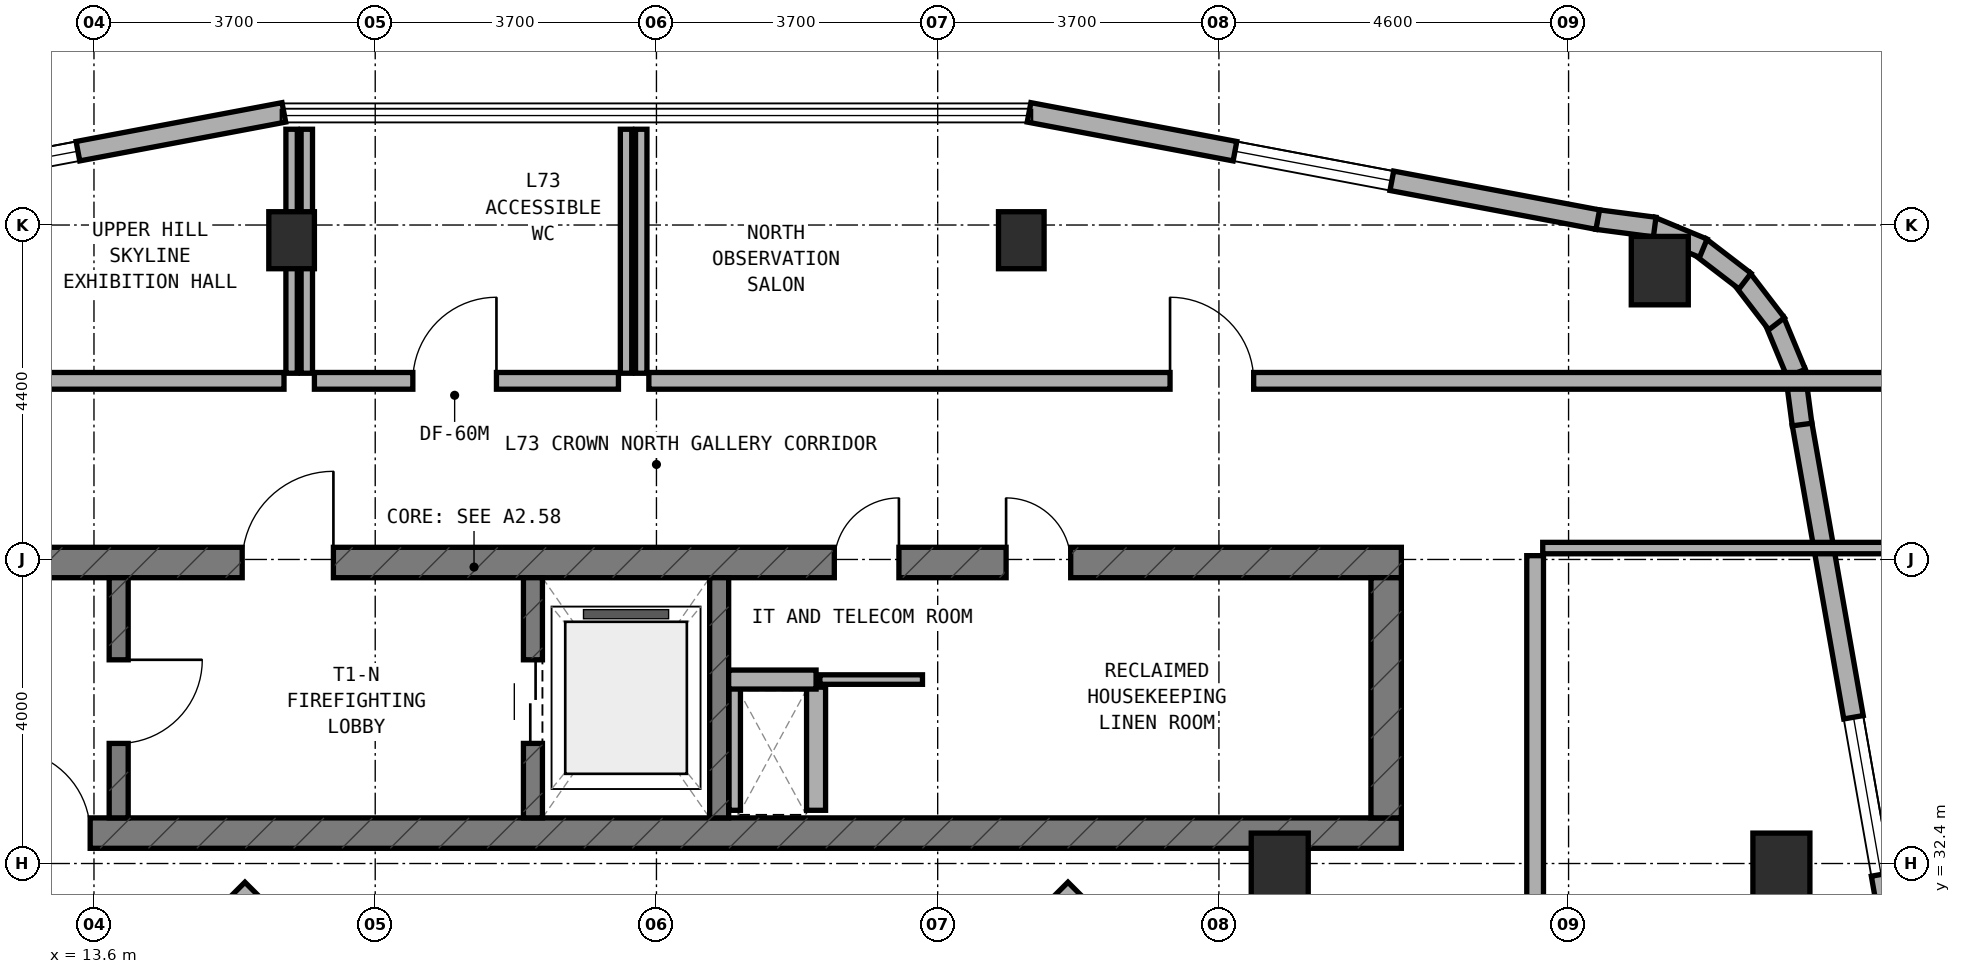
"""IFC4 building model, lengths in metres.
Left out: names, types, materials, properties, quantities, classifications, styles, units other than length and angle.
Written with IfcOpenShell. Run it as: python <this file> out.ifc"""

import sys

from ifc_helpers import new_model, si_unit, direction, frame, frame_2d, origin, origin_2d, place, context, subcontext, project, spatial, rectangle, extrude, element, fill, save


model = new_model("IFC4")
c1 = context("Model", 3, precision=1e-05, world=origin(), true_north=direction((0.0, 1.0)))
c2 = subcontext(c1, "Body", "Model", "MODEL_VIEW")
j1 = project(units=[si_unit("LENGTHUNIT", "METRE"), si_unit("PLANEANGLEUNIT", "RADIAN")], contexts=[c1])
p1 = place(None, origin())
s1 = spatial("IfcSite", under=j1, at=p1, CompositionType="ELEMENT")
p2 = place(p1, origin())
s2 = spatial("IfcBuilding", under=s1, at=p2, CompositionType="ELEMENT")
p3 = place(p2, frame((0.0, 0.0, 268.4)))
s3 = spatial("IfcBuildingStorey", under=s2, at=p3, CompositionType="ELEMENT", Elevation=268.4)
p4 = place(p3, frame((6.4, 32.8, 0.0), z_axis=(0.0, 0.0, 1.0), x_axis=(1.0, 0.0, 0.0)))
e1 = element("IfcWall", 1, at=p4, inside=s3, PredefinedType="SHEAR", context=c2, shape_type="SweptSolid", body=[
    extrude(rectangle(XDim=24.4, YDim=0.4, at=frame_2d((12.2, 0.0))), origin(), (0.0, 0.0, 1.0), 3.6),
])
p5 = place(p4, frame((6.05, 0.0, 0.0)))
e2 = element("IfcOpeningElement", 2, at=p5, cuts=e1, PredefinedType="OPENING", context=c2, shape_type="SweptSolid", body=[
    extrude(rectangle(XDim=1.1, YDim=2.15, at=frame_2d((0.55, 1.075))), frame((0.0, 0.21, 0.0), z_axis=(0.0, -1.0, 0.0), x_axis=(1.0, 0.0, 0.0)), (0.0, 0.0, 1.0), 0.42),
])
p6 = place(p3, frame((6.4, 36.36, 0.0), z_axis=(0.0, 0.0, 1.0), x_axis=(1.0, 0.0, 0.0)))
e3 = element("IfcWall", 3, at=p6, inside=s3, PredefinedType="SHEAR", context=c2, shape_type="SweptSolid", body=[
    extrude(rectangle(XDim=24.4, YDim=0.4, at=frame_2d((12.2, 0.0))), origin(), (0.0, 0.0, 1.0), 3.6),
])
p7 = place(p6, frame((9.15, 0.0, 0.0)))
e4 = element("IfcOpeningElement", 4, at=p7, cuts=e3, PredefinedType="OPENING", context=c2, shape_type="SweptSolid", body=[
    extrude(rectangle(XDim=1.2, YDim=2.15, at=frame_2d((0.6, 1.075))), frame((0.0, 0.21, 0.0), z_axis=(0.0, -1.0, 0.0), x_axis=(1.0, 0.0, 0.0)), (0.0, 0.0, 1.0), 0.42),
])
p8 = place(p6, frame((19.2, 0.0, 0.0)))
e5 = element("IfcOpeningElement", 5, at=p8, cuts=e3, PredefinedType="OPENING", context=c2, shape_type="SweptSolid", body=[
    extrude(rectangle(XDim=0.85, YDim=2.1, at=frame_2d((0.425, 1.05))), frame((0.0, 0.21, 0.0), z_axis=(0.0, -1.0, 0.0), x_axis=(1.0, 0.0, 0.0)), (0.0, 0.0, 1.0), 0.42),
])
p9 = place(p6, frame((16.94, 0.0, 0.0)))
e6 = element("IfcOpeningElement", 6, at=p9, cuts=e3, PredefinedType="OPENING", context=c2, shape_type="SweptSolid", body=[
    extrude(rectangle(XDim=0.85, YDim=2.1, at=frame_2d((0.425, 1.05))), frame((0.0, 0.21, 0.0), z_axis=(0.0, -1.0, 0.0), x_axis=(1.0, 0.0, 0.0)), (0.0, 0.0, 1.0), 0.42),
])
p10 = place(p3, frame((30.6, 33.0, 0.0), z_axis=(0.0, 0.0, 1.0), x_axis=(0.0, 1.0, 0.0)))
e7 = element("IfcWall", 7, at=p10, inside=s3, PredefinedType="SHEAR", context=c2, shape_type="SweptSolid", body=[
    extrude(rectangle(XDim=3.16, YDim=0.4, at=frame_2d((1.58, 0.0))), origin(), (0.0, 0.0, 1.0), 3.6),
])
p11 = place(p3, frame((13.925, 33.0, 0.0), z_axis=(0.0, 0.0, 1.0), x_axis=(0.0, 1.0, 0.0)))
e8 = element("IfcWall", 8, at=p11, inside=s3, PredefinedType="STANDARD", context=c2, shape_type="SweptSolid", body=[
    extrude(rectangle(XDim=3.16, YDim=0.25, at=frame_2d((1.58, 0.0))), origin(), (0.0, 0.0, 1.0), 3.32),
])
p12 = place(p11, frame((0.98, 0.0, 0.0)))
e9 = element("IfcOpeningElement", 9, at=p12, cuts=e8, PredefinedType="OPENING", context=c2, shape_type="SweptSolid", body=[
    extrude(rectangle(XDim=1.1, YDim=2.15, at=frame_2d((0.55, 1.075))), frame((0.0, 0.135, 0.0), z_axis=(0.0, -1.0, 0.0), x_axis=(1.0, 0.0, 0.0)), (0.0, 0.0, 1.0), 0.27),
])
p13 = place(p3, frame((19.375, 33.0, 0.0), z_axis=(0.0, 0.0, 1.0), x_axis=(0.0, 1.0, 0.0)))
e10 = element("IfcWall", 10, at=p13, inside=s3, PredefinedType="STANDARD", context=c2, shape_type="SweptSolid", body=[
    extrude(rectangle(XDim=3.16, YDim=0.25, at=frame_2d((1.58, 0.0))), origin(), (0.0, 0.0, 1.0), 3.32),
])
p14 = place(p13, frame((0.98, 0.0, 0.0)))
e11 = element("IfcOpeningElement", 11, at=p14, cuts=e10, PredefinedType="OPENING", context=c2, shape_type="SweptSolid", body=[
    extrude(rectangle(XDim=1.1, YDim=2.15, at=frame_2d((0.55, 1.075))), frame((0.0, 0.135, 0.0), z_axis=(0.0, -1.0, 0.0), x_axis=(1.0, 0.0, 0.0)), (0.0, 0.0, 1.0), 0.27),
])
p15 = place(p3, frame((21.825, 33.0, 0.0), z_axis=(0.0, 0.0, 1.0), x_axis=(0.0, 1.0, 0.0)))
e12 = element("IfcWall", 12, at=p15, inside=s3, PredefinedType="STANDARD", context=c2, shape_type="SweptSolid", body=[
    extrude(rectangle(XDim=3.16, YDim=0.25, at=frame_2d((1.58, 0.0))), origin(), (0.0, 0.0, 1.0), 3.32),
])
for number, where, z_axis, x_axis in (
    (13, (16.2, 40.6, 0.0), (0.0, 0.0, 1.0), (1.0, 0.0, 0.0)),
    (14, (25.8, 40.6, 0.0), (0.0, 0.0, 1.0), (1.0, 0.0, 0.0)),
):
    element("IfcColumn", number, at=place(p3, frame(where, z_axis=z_axis, x_axis=x_axis)), inside=s3, PredefinedType="COLUMN", context=c2, shape_type="SweptSolid", body=[
        extrude(rectangle(XDim=0.6, YDim=0.75, at=origin_2d()), origin(), (0.0, 0.0, 1.0), 3.6),
    ])
for number, where, z_axis, x_axis in (
    (15, (34.2, 40.2, 0.0), (0.0, 0.0, 1.0), (1.0, 0.0, 0.0)),
    (16, (35.8, 32.35, 0.0), (0.0, 0.0, 1.0), (1.0, 0.0, 0.0)),
    (17, (29.2, 32.35, 0.0), (0.0, 0.0, 1.0), (1.0, 0.0, 0.0)),
):
    element("IfcColumn", number, at=place(p3, frame(where, z_axis=z_axis, x_axis=x_axis)), inside=s3, PredefinedType="COLUMN", context=c2, shape_type="SweptSolid", body=[
        extrude(rectangle(XDim=0.75, YDim=0.9, at=origin_2d()), origin(), (0.0, 0.0, 1.0), 3.6),
    ])
p16 = place(p3, frame((37.482, 30.144, 0.0), z_axis=(0.0, 0.0, 1.0), x_axis=(-0.172801004781, 0.98495675679, 0.0)))
e18 = element("IfcWall", 18, at=p16, inside=s3, PredefinedType="STANDARD", context=c2, shape_type="SweptSolid", body=[
    extrude(rectangle(XDim=8.165, YDim=0.26, at=frame_2d((4.083, 0.0))), origin(), (0.0, 0.0, 1.0), 3.32),
])
p17 = place(p16, frame((2.144, 0.0, 0.85)))
e19 = element("IfcOpeningElement", 19, at=p17, cuts=e18, PredefinedType="OPENING", context=c2, shape_type="SweptSolid", body=[
    extrude(rectangle(XDim=2.1, YDim=1.5, at=frame_2d((1.05, 0.75))), frame((0.0, 0.14, 0.0), z_axis=(0.0, -1.0, 0.0), x_axis=(1.0, 0.0, 0.0)), (0.0, 0.0, 1.0), 0.28),
])
p18 = place(p3, frame((36.072, 38.175, 0.0), z_axis=(0.0, 0.0, 1.0), x_axis=(-0.130255288807, 0.991480488834, 0.0)))
e20 = element("IfcWall", 20, at=p18, inside=s3, PredefinedType="STANDARD", context=c2, shape_type="SweptSolid", body=[
    extrude(rectangle(XDim=0.729, YDim=0.26, at=frame_2d((0.365, 0.0))), origin(), (0.0, 0.0, 1.0), 3.32),
])
for number, where, z_axis, x_axis in (
    (21, (35.995, 38.852, 0.0), (0.0, 0.0, 1.0), (-0.384, 0.924, 0.0)),
    (22, (35.737, 39.501, 0.0), (0.0, 0.0, 1.0), (-0.609, 0.793, 0.0)),
    (23, (35.321, 40.062, 0.0), (0.0, 0.0, 1.0), (-0.793, 0.609, 0.0)),
):
    element("IfcWall", number, at=place(p3, frame(where, z_axis=z_axis, x_axis=x_axis)), inside=s3, PredefinedType="STANDARD", context=c2, shape_type="SweptSolid", body=[
        extrude(rectangle(XDim=0.746, YDim=0.26, at=frame_2d((0.373, 0.0))), origin(), (0.0, 0.0, 1.0), 3.32),
    ])
p19 = place(p3, frame((34.773, 40.495, 0.0), z_axis=(0.0, 0.0, 1.0), x_axis=(-0.923637576129, 0.383267045233, 0.0)))
e24 = element("IfcWall", 24, at=p19, inside=s3, PredefinedType="STANDARD", context=c2, shape_type="SweptSolid", body=[
    extrude(rectangle(XDim=0.746, YDim=0.26, at=frame_2d((0.373, 0.0))), origin(), (0.0, 0.0, 1.0), 3.32),
])
p20 = place(p3, frame((34.133, 40.773, 0.0), z_axis=(0.0, 0.0, 1.0), x_axis=(-0.991559404866, 0.129653178221, 0.0)))
e25 = element("IfcWall", 25, at=p20, inside=s3, PredefinedType="STANDARD", context=c2, shape_type="SweptSolid", body=[
    extrude(rectangle(XDim=0.764, YDim=0.26, at=frame_2d((0.382, 0.0))), origin(), (0.0, 0.0, 1.0), 3.32),
])
p21 = place(p3, frame((33.384, 40.871, 0.0), z_axis=(0.0, 0.0, 1.0), x_axis=(-0.982680718126, 0.185306789468, 0.0)))
e26 = element("IfcWall", 26, at=p21, inside=s3, PredefinedType="STANDARD", context=c2, shape_type="SweptSolid", body=[
    extrude(rectangle(XDim=7.614, YDim=0.26, at=frame_2d((3.807, 0.0))), origin(), (0.0, 0.0, 1.0), 3.32),
])
p22 = place(p21, frame((2.757, 0.0, 0.85)))
e27 = element("IfcOpeningElement", 27, at=p22, cuts=e26, PredefinedType="OPENING", context=c2, shape_type="SweptSolid", body=[
    extrude(rectangle(XDim=2.1, YDim=1.5, at=frame_2d((1.05, 0.75))), frame((0.0, 0.14, 0.0), z_axis=(0.0, -1.0, 0.0), x_axis=(1.0, 0.0, 0.0)), (0.0, 0.0, 1.0), 0.28),
])
p23 = place(p3, frame((16.098, 42.282, 0.0), z_axis=(0.0, 0.0, 1.0), x_axis=(-0.982680718126, -0.185306789468, 0.0)))
e28 = element("IfcWall", 28, at=p23, inside=s3, PredefinedType="STANDARD", context=c2, shape_type="SweptSolid", body=[
    extrude(rectangle(XDim=7.614, YDim=0.26, at=frame_2d((3.807, 0.0))), origin(), (0.0, 0.0, 1.0), 3.32),
])
p24 = place(p23, frame((2.757, 0.0, 0.85)))
e29 = element("IfcOpeningElement", 29, at=p24, cuts=e28, PredefinedType="OPENING", context=c2, shape_type="SweptSolid", body=[
    extrude(rectangle(XDim=2.1, YDim=1.5, at=frame_2d((1.05, 0.75))), frame((0.0, 0.14, 0.0), z_axis=(0.0, -1.0, 0.0), x_axis=(1.0, 0.0, 0.0)), (0.0, 0.0, 1.0), 0.28),
])
for number, where, z_axis, x_axis in (
    (30, (27.956, 30.428, 0.0), (0.0, 0.0, 1.0), (-0.707, 0.707, 0.0)),
    (31, (15.678, 32.062, 0.0), (0.0, 0.0, 1.0), (-0.707, -0.707, 0.0)),
):
    element("IfcWall", number, at=place(p3, frame(where, z_axis=z_axis, x_axis=x_axis)), inside=s3, PredefinedType="STANDARD", context=c2, shape_type="SweptSolid", body=[
        extrude(rectangle(XDim=2.311, YDim=0.26, at=frame_2d((1.155, 0.0))), origin(), (0.0, 0.0, 1.0), 3.32),
    ])
p25 = place(p3, frame((22.03, 33.1, 0.0), z_axis=(0.0, 0.0, 1.0), x_axis=(0.0, 1.0, 0.0)))
e32 = element("IfcWall", 32, at=p25, inside=s3, PredefinedType="PARTITIONING", context=c2, shape_type="SweptSolid", body=[
    extrude(rectangle(XDim=1.62, YDim=0.15, at=frame_2d((0.81, 0.0))), origin(), (0.0, 0.0, 1.0), 3.32),
])
p26 = place(p3, frame((23.1, 33.1, 0.0), z_axis=(0.0, 0.0, 1.0), x_axis=(0.0, 1.0, 0.0)))
e33 = element("IfcWall", 33, at=p26, inside=s3, PredefinedType="SOLIDWALL", context=c2, shape_type="SweptSolid", body=[
    extrude(rectangle(XDim=1.62, YDim=0.25, at=frame_2d((0.81, 0.0))), origin(), (0.0, 0.0, 1.0), 3.32),
])
p27 = place(p3, frame((21.95, 34.82, 0.0), z_axis=(0.0, 0.0, 1.0), x_axis=(1.0, 0.0, 0.0)))
e34 = element("IfcWall", 34, at=p27, inside=s3, PredefinedType="SOLIDWALL", context=c2, shape_type="SweptSolid", body=[
    extrude(rectangle(XDim=1.15, YDim=0.25, at=frame_2d((0.575, 0.0))), origin(), (0.0, 0.0, 1.0), 3.32),
])
p28 = place(p3, frame((23.15, 34.82, 0.0), z_axis=(0.0, 0.0, 1.0), x_axis=(1.0, 0.0, 0.0)))
e35 = element("IfcWall", 35, at=p28, inside=s3, PredefinedType="PARTITIONING", context=c2, shape_type="SweptSolid", body=[
    extrude(rectangle(XDim=1.35, YDim=0.125, at=frame_2d((0.675, 0.0))), origin(), (0.0, 0.0, 1.0), 3.32),
])
p29 = place(p3, frame((32.66, 36.55, 0.0), z_axis=(0.0, 0.0, 1.0), x_axis=(1.0, 0.0, 0.0)))
e36 = element("IfcWall", 36, at=p29, inside=s3, PredefinedType="PARTITIONING", context=c2, shape_type="SweptSolid", body=[
    extrude(rectangle(XDim=4.6, YDim=0.15, at=frame_2d((2.3, 0.0))), origin(), (0.0, 0.0, 1.0), 2.795),
])
p30 = place(p3, frame((32.56, 13.55, 0.0), z_axis=(0.0, 0.0, 1.0), x_axis=(0.0, 1.0, 0.0)))
e37 = element("IfcWall", 37, at=p30, inside=s3, PredefinedType="SOLIDWALL", context=c2, shape_type="SweptSolid", body=[
    extrude(rectangle(XDim=22.9, YDim=0.22, at=frame_2d((11.45, 0.0))), origin(), (0.0, 0.0, 1.0), 2.795),
])
p31 = place(p30, frame((9.8, 0.0, 0.0)))
e38 = element("IfcOpeningElement", 38, at=p31, cuts=e37, PredefinedType="OPENING", context=c2, shape_type="SweptSolid", body=[
    extrude(rectangle(XDim=1.1, YDim=2.1, at=frame_2d((0.55, 1.05))), frame((0.0, 0.12, 0.0), z_axis=(0.0, -1.0, 0.0), x_axis=(1.0, 0.0, 0.0)), (0.0, 0.0, 1.0), 0.24),
])
p32 = place(p3, frame((16.2, 38.85, 0.0), z_axis=(0.0, 0.0, 1.0), x_axis=(0.0, 1.0, 0.0)))
e39 = element("IfcWall", 39, at=p32, inside=s3, PredefinedType="PARTITIONING", context=c2, shape_type="SweptSolid", body=[
    extrude(rectangle(XDim=3.21, YDim=0.15, at=frame_2d((1.605, 0.0))), origin(), (0.0, 0.0, 1.0), 2.795),
])
p33 = place(p3, frame((4.74, 38.75, 0.0), z_axis=(0.0, 0.0, 1.0), x_axis=(1.0, 0.0, 0.0)))
e40 = element("IfcWall", 40, at=p33, inside=s3, PredefinedType="SOLIDWALL", context=c2, shape_type="SweptSolid", body=[
    extrude(rectangle(XDim=11.36, YDim=0.22, at=frame_2d((5.68, 0.0))), origin(), (0.0, 0.0, 1.0), 2.795),
])
p34 = place(p33, frame((4.607, 0.0, 0.0)))
e41 = element("IfcOpeningElement", 41, at=p34, cuts=e40, PredefinedType="OPENING", context=c2, shape_type="SweptSolid", body=[
    extrude(rectangle(XDim=1.1, YDim=2.1, at=frame_2d((0.55, 1.05))), frame((0.0, 0.12, 0.0), z_axis=(0.0, -1.0, 0.0), x_axis=(1.0, 0.0, 0.0)), (0.0, 0.0, 1.0), 0.24),
])
for number, where, z_axis, x_axis in (
    (42, (16.4, 38.85, 0.0), (0.0, 0.0, 1.0), (0.0, 1.0, 0.0)),
    (43, (20.6, 38.85, 0.0), (0.0, 0.0, 1.0), (0.0, 1.0, 0.0)),
):
    element("IfcWall", number, at=place(p3, frame(where, z_axis=z_axis, x_axis=x_axis)), inside=s3, PredefinedType="PARTITIONING", context=c2, shape_type="SweptSolid", body=[
        extrude(rectangle(XDim=3.21, YDim=0.15, at=frame_2d((1.605, 0.0))), origin(), (0.0, 0.0, 1.0), 3.015),
    ])
p35 = place(p3, frame((16.5, 38.75, 0.0), z_axis=(0.0, 0.0, 1.0), x_axis=(1.0, 0.0, 0.0)))
e44 = element("IfcWall", 44, at=p35, inside=s3, PredefinedType="SOLIDWALL", context=c2, shape_type="SweptSolid", body=[
    extrude(rectangle(XDim=4.0, YDim=0.22, at=frame_2d((2.0, 0.0))), origin(), (0.0, 0.0, 1.0), 2.995),
])
p36 = place(p35, frame((1.295, 0.0, 0.0)))
e45 = element("IfcOpeningElement", 45, at=p36, cuts=e44, PredefinedType="OPENING", context=c2, shape_type="SweptSolid", body=[
    extrude(rectangle(XDim=1.1, YDim=2.1, at=frame_2d((0.55, 1.05))), frame((0.0, 0.12, 0.0), z_axis=(0.0, -1.0, 0.0), x_axis=(1.0, 0.0, 0.0)), (0.0, 0.0, 1.0), 0.24),
])
p37 = place(p3, frame((20.8, 38.85, 0.0), z_axis=(0.0, 0.0, 1.0), x_axis=(0.0, 1.0, 0.0)))
e46 = element("IfcWall", 46, at=p37, inside=s3, PredefinedType="PARTITIONING", context=c2, shape_type="SweptSolid", body=[
    extrude(rectangle(XDim=3.21, YDim=0.15, at=frame_2d((1.605, 0.0))), origin(), (0.0, 0.0, 1.0), 3.015),
])
p38 = place(p3, frame((20.9, 38.75, 0.0), z_axis=(0.0, 0.0, 1.0), x_axis=(1.0, 0.0, 0.0)))
e47 = element("IfcWall", 47, at=p38, inside=s3, PredefinedType="SOLIDWALL", context=c2, shape_type="SweptSolid", body=[
    extrude(rectangle(XDim=16.36, YDim=0.22, at=frame_2d((8.18, 0.0))), origin(), (0.0, 0.0, 1.0), 2.795),
])
p39 = place(p38, frame((6.857, 0.0, 0.0)))
e48 = element("IfcOpeningElement", 48, at=p39, cuts=e47, PredefinedType="OPENING", context=c2, shape_type="SweptSolid", body=[
    extrude(rectangle(XDim=1.1, YDim=2.1, at=frame_2d((0.55, 1.05))), frame((0.0, 0.12, 0.0), z_axis=(0.0, -1.0, 0.0), x_axis=(1.0, 0.0, 0.0)), (0.0, 0.0, 1.0), 0.24),
])
p40 = place(p17, origin())
e49 = element("IfcWindow", 49, at=p40, inside=s3, PartitioningType="SINGLE_PANEL", PredefinedType="WINDOW", context=c2, shape_type="SweptSolid", body=[
    extrude(rectangle(XDim=2.1, YDim=1.5, at=frame_2d((1.05, 0.75))), frame((0.0, 0.03, 0.0), z_axis=(0.0, -1.0, 0.0), x_axis=(1.0, 0.0, 0.0)), (0.0, 0.0, 1.0), 0.06),
])
fill(e19, e49)
p41 = place(p22, origin())
e50 = element("IfcWindow", 50, at=p41, inside=s3, PartitioningType="SINGLE_PANEL", PredefinedType="WINDOW", context=c2, shape_type="SweptSolid", body=[
    extrude(rectangle(XDim=2.1, YDim=1.5, at=frame_2d((1.05, 0.75))), frame((0.0, 0.03, 0.0), z_axis=(0.0, -1.0, 0.0), x_axis=(1.0, 0.0, 0.0)), (0.0, 0.0, 1.0), 0.06),
])
fill(e27, e50)
p42 = place(p24, origin())
e51 = element("IfcWindow", 51, at=p42, inside=s3, PartitioningType="SINGLE_PANEL", PredefinedType="WINDOW", context=c2, shape_type="SweptSolid", body=[
    extrude(rectangle(XDim=2.1, YDim=1.5, at=frame_2d((1.05, 0.75))), frame((0.0, 0.03, 0.0), z_axis=(0.0, -1.0, 0.0), x_axis=(1.0, 0.0, 0.0)), (0.0, 0.0, 1.0), 0.06),
])
fill(e29, e51)
p43 = place(p12, frame((1.1, 0.0, 0.0), z_axis=(0.0, 0.0, 1.0), x_axis=(-1.0, 0.0, 0.0)))
e52 = element("IfcDoor", 52, at=p43, inside=s3, OperationType="SINGLE_SWING_LEFT", PredefinedType="DOOR", context=c2, shape_type="SweptSolid", body=[
    extrude(rectangle(XDim=1.1, YDim=2.15, at=frame_2d((0.55, 1.075))), frame((0.0, 0.025, 0.0), z_axis=(0.0, -1.0, 0.0), x_axis=(1.0, 0.0, 0.0)), (0.0, 0.0, 1.0), 0.05),
])
fill(e9, e52)
p44 = place(p7, origin())
e53 = element("IfcDoor", 53, at=p44, inside=s3, OperationType="SINGLE_SWING_RIGHT", PredefinedType="DOOR", context=c2, shape_type="SweptSolid", body=[
    extrude(rectangle(XDim=1.2, YDim=2.15, at=frame_2d((0.6, 1.075))), frame((0.0, 0.025, 0.0), z_axis=(0.0, -1.0, 0.0), x_axis=(1.0, 0.0, 0.0)), (0.0, 0.0, 1.0), 0.05),
])
fill(e4, e53)
p45 = place(p14, origin())
e54 = element("IfcDoor", 54, at=p45, inside=s3, OperationType="DOUBLE_DOOR_SLIDING", PredefinedType="DOOR", context=c2, shape_type="SweptSolid", body=[
    extrude(rectangle(XDim=1.1, YDim=2.15, at=frame_2d((0.55, 1.075))), frame((0.0, 0.025, 0.0), z_axis=(0.0, -1.0, 0.0), x_axis=(1.0, 0.0, 0.0)), (0.0, 0.0, 1.0), 0.05),
])
fill(e11, e54)
p46 = place(p8, origin())
e55 = element("IfcDoor", 55, at=p46, inside=s3, OperationType="SINGLE_SWING_LEFT", PredefinedType="DOOR", context=c2, shape_type="SweptSolid", body=[
    extrude(rectangle(XDim=0.85, YDim=2.1, at=frame_2d((0.425, 1.05))), frame((0.0, 0.025, 0.0), z_axis=(0.0, -1.0, 0.0), x_axis=(1.0, 0.0, 0.0)), (0.0, 0.0, 1.0), 0.05),
])
fill(e5, e55)
p47 = place(p9, origin())
e56 = element("IfcDoor", 56, at=p47, inside=s3, OperationType="SINGLE_SWING_RIGHT", PredefinedType="DOOR", context=c2, shape_type="SweptSolid", body=[
    extrude(rectangle(XDim=0.85, YDim=2.1, at=frame_2d((0.425, 1.05))), frame((0.0, 0.025, 0.0), z_axis=(0.0, -1.0, 0.0), x_axis=(1.0, 0.0, 0.0)), (0.0, 0.0, 1.0), 0.05),
])
fill(e6, e56)
p48 = place(p5, origin())
e57 = element("IfcDoor", 57, at=p48, inside=s3, OperationType="SINGLE_SWING_LEFT", PredefinedType="DOOR", context=c2, shape_type="SweptSolid", body=[
    extrude(rectangle(XDim=1.1, YDim=2.15, at=frame_2d((0.55, 1.075))), frame((0.0, 0.025, 0.0), z_axis=(0.0, -1.0, 0.0), x_axis=(1.0, 0.0, 0.0)), (0.0, 0.0, 1.0), 0.05),
])
fill(e2, e57)
p49 = place(p36, origin())
e58 = element("IfcDoor", 58, at=p49, inside=s3, OperationType="SINGLE_SWING_RIGHT", PredefinedType="DOOR", context=c2, shape_type="SweptSolid", body=[
    extrude(rectangle(XDim=1.1, YDim=2.1, at=frame_2d((0.55, 1.05))), frame((0.0, 0.025, 0.0), z_axis=(0.0, -1.0, 0.0), x_axis=(1.0, 0.0, 0.0)), (0.0, 0.0, 1.0), 0.05),
])
fill(e45, e58)
p50 = place(p39, origin())
e59 = element("IfcDoor", 59, at=p50, inside=s3, OperationType="SINGLE_SWING_LEFT", PredefinedType="DOOR", context=c2, shape_type="SweptSolid", body=[
    extrude(rectangle(XDim=1.1, YDim=2.1, at=frame_2d((0.55, 1.05))), frame((0.0, 0.025, 0.0), z_axis=(0.0, -1.0, 0.0), x_axis=(1.0, 0.0, 0.0)), (0.0, 0.0, 1.0), 0.05),
])
fill(e48, e59)
save(model, sys.argv[1])
